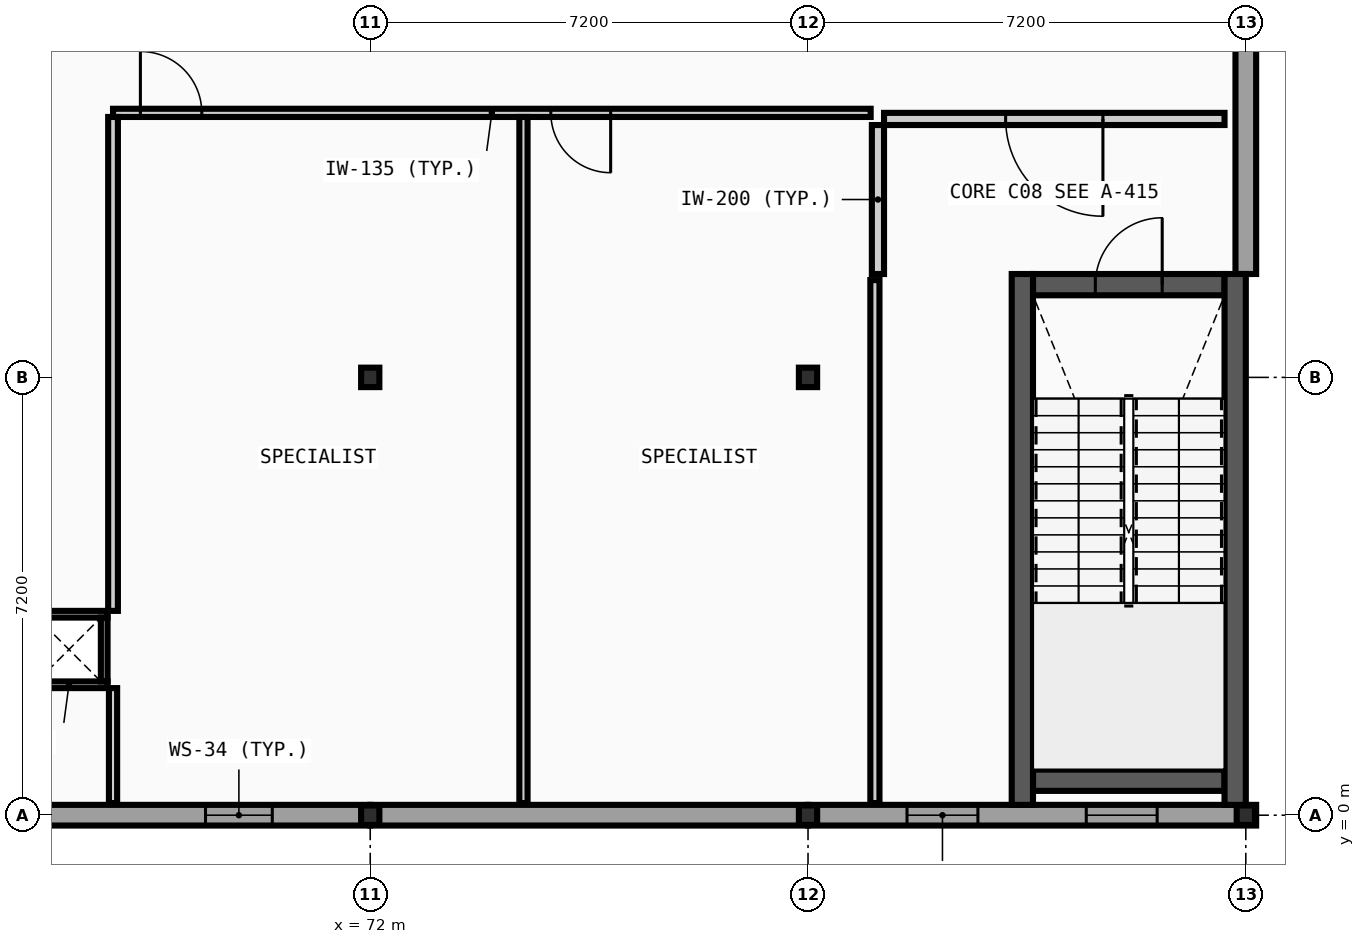
"""IFC4 building model, lengths in metres.
Left out: names, types, materials, properties, quantities, classifications, styles, units other than length and angle.
Written with IfcOpenShell. Run it as: python <this file> out.ifc"""

import sys

from ifc_helpers import new_model, si_unit, direction, frame, frame_2d, origin, origin_2d, place, context, subcontext, project, spatial, rectangle, i_section, extrude, element, fill, save


model = new_model("IFC4")
c1 = context("Model", 3, precision=1e-05, world=origin(), true_north=direction((0.0, 1.0)))
c2 = subcontext(c1, "Body", "Model", "MODEL_VIEW")
j1 = project(units=[si_unit("LENGTHUNIT", "METRE"), si_unit("PLANEANGLEUNIT", "RADIAN")], contexts=[c1])
p1 = place(None, origin())
s1 = spatial("IfcSite", under=j1, at=p1, CompositionType="ELEMENT")
p2 = place(p1, origin())
s2 = spatial("IfcBuilding", under=s1, at=p2, CompositionType="ELEMENT")
p3 = place(p2, frame((0.0, 0.0, 14.0)))
s3 = spatial("IfcBuildingStorey", under=s2, at=p3, CompositionType="ELEMENT", Elevation=14.0)
for number, where, z_axis, x_axis in (
    (1, (72.0, 0.0, 0.0), (0.0, 0.0, 1.0), (1.0, 0.0, 0.0)),
    (2, (72.0, 7.2, 0.0), (0.0, 0.0, 1.0), (1.0, 0.0, 0.0)),
    (3, (79.2, 0.0, 0.0), (0.0, 0.0, 1.0), (1.0, 0.0, 0.0)),
    (4, (79.2, 7.2, 0.0), (0.0, 0.0, 1.0), (1.0, 0.0, 0.0)),
    (5, (86.4, 0.0, 0.0), (0.0, 0.0, 1.0), (1.0, 0.0, 0.0)),
):
    element("IfcColumn", number, at=place(p3, frame(where, z_axis=z_axis, x_axis=x_axis)), inside=s3, PredefinedType="COLUMN", context=c2, shape_type="SweptSolid", body=[
        extrude(i_section(OverallWidth=0.3, OverallDepth=0.32, WebThickness=0.011, FlangeThickness=0.021, FilletRadius=0.027, at=origin_2d()), origin(), (0.0, 0.0, 1.0), 4.4),
    ])
p4 = place(p3, frame((64.8, 0.0, 0.0), z_axis=(0.0, 0.0, 1.0), x_axis=(1.0, 0.0, 0.0)))
e6 = element("IfcWall", 6, at=p4, inside=s3, PredefinedType="STANDARD", context=c2, shape_type="SweptSolid", body=[
    extrude(rectangle(XDim=7.2, YDim=0.34, at=frame_2d((3.6, 0.0))), origin(), (0.0, 0.0, 1.0), 3.935),
])
p5 = place(p4, frame((4.491, 0.0, 0.95)))
e7 = element("IfcOpeningElement", 7, at=p5, cuts=e6, PredefinedType="OPENING", context=c2, shape_type="SweptSolid", body=[
    extrude(rectangle(XDim=1.098, YDim=1.332, at=frame_2d((0.549, 0.666))), frame((0.0, 0.18, 0.0), z_axis=(0.0, -1.0, 0.0), x_axis=(1.0, 0.0, 0.0)), (0.0, 0.0, 1.0), 0.36),
])
p6 = place(p3, frame((72.0, 0.0, 0.0), z_axis=(0.0, 0.0, 1.0), x_axis=(1.0, 0.0, 0.0)))
e8 = element("IfcWall", 8, at=p6, inside=s3, PredefinedType="STANDARD", context=c2, shape_type="SweptSolid", body=[
    extrude(rectangle(XDim=7.2, YDim=0.34, at=frame_2d((3.6, 0.0))), origin(), (0.0, 0.0, 1.0), 3.935),
])
p7 = place(p3, frame((79.2, 0.0, 0.0), z_axis=(0.0, 0.0, 1.0), x_axis=(1.0, 0.0, 0.0)))
e9 = element("IfcWall", 9, at=p7, inside=s3, PredefinedType="STANDARD", context=c2, shape_type="SweptSolid", body=[
    extrude(rectangle(XDim=7.37, YDim=0.34, at=frame_2d((3.685, 0.0))), origin(), (0.0, 0.0, 1.0), 3.935),
])
p8 = place(p7, frame((1.628, 0.0, 0.95)))
e10 = element("IfcOpeningElement", 10, at=p8, cuts=e9, PredefinedType="OPENING", context=c2, shape_type="SweptSolid", body=[
    extrude(rectangle(XDim=1.166, YDim=1.332, at=frame_2d((0.583, 0.666))), frame((0.0, 0.18, 0.0), z_axis=(0.0, -1.0, 0.0), x_axis=(1.0, 0.0, 0.0)), (0.0, 0.0, 1.0), 0.36),
])
p9 = place(p7, frame((4.576, 0.0, 0.95)))
e11 = element("IfcOpeningElement", 11, at=p9, cuts=e9, PredefinedType="OPENING", context=c2, shape_type="SweptSolid", body=[
    extrude(rectangle(XDim=1.166, YDim=1.332, at=frame_2d((0.583, 0.666))), frame((0.0, 0.18, 0.0), z_axis=(0.0, -1.0, 0.0), x_axis=(1.0, 0.0, 0.0)), (0.0, 0.0, 1.0), 0.36),
])
p10 = place(p3, frame((86.4, 8.9, 0.0), z_axis=(0.0, 0.0, 1.0), x_axis=(0.0, 1.0, 0.0)))
e12 = element("IfcWall", 12, at=p10, inside=s3, PredefinedType="STANDARD", context=c2, shape_type="SweptSolid", body=[
    extrude(rectangle(XDim=5.5, YDim=0.34, at=frame_2d((2.75, 0.0))), origin(), (0.0, 0.0, 1.0), 4.2),
])
p11 = place(p3, frame((82.9, 0.575, 0.0), z_axis=(0.0, 0.0, 1.0), x_axis=(1.0, 0.0, 0.0)))
e13 = element("IfcWall", 13, at=p11, inside=s3, PredefinedType="SHEAR", context=c2, shape_type="SweptSolid", body=[
    extrude(rectangle(XDim=3.15, YDim=0.35, at=frame_2d((1.575, 0.0))), origin(), (0.0, 0.0, 1.0), 4.2),
])
p12 = place(p3, frame((82.9, 8.725, 0.0), z_axis=(0.0, 0.0, 1.0), x_axis=(1.0, 0.0, 0.0)))
e14 = element("IfcWall", 14, at=p12, inside=s3, PredefinedType="SHEAR", context=c2, shape_type="SweptSolid", body=[
    extrude(rectangle(XDim=3.15, YDim=0.35, at=frame_2d((1.575, 0.0))), origin(), (0.0, 0.0, 1.0), 4.2),
])
p13 = place(p12, frame((1.025, 0.0, 0.0)))
e15 = element("IfcOpeningElement", 15, at=p13, cuts=e14, PredefinedType="OPENING", context=c2, shape_type="SweptSolid", body=[
    extrude(rectangle(XDim=1.1, YDim=2.15, at=frame_2d((0.55, 1.075))), frame((0.0, 0.185, 0.0), z_axis=(0.0, -1.0, 0.0), x_axis=(1.0, 0.0, 0.0)), (0.0, 0.0, 1.0), 0.37),
])
for number, where, z_axis, x_axis in (
    (16, (82.725, 0.17, 0.0), (0.0, 0.0, 1.0), (0.0, 1.0, 0.0)),
    (17, (86.225, 0.17, 0.0), (0.0, 0.0, 1.0), (0.0, 1.0, 0.0)),
):
    element("IfcWall", number, at=place(p3, frame(where, z_axis=z_axis, x_axis=x_axis)), inside=s3, PredefinedType="SHEAR", context=c2, shape_type="SweptSolid", body=[
        extrude(rectangle(XDim=8.73, YDim=0.35, at=frame_2d((4.365, 0.0))), origin(), (0.0, 0.0, 1.0), 4.2),
    ])
p14 = place(p3, frame((80.45, 11.45, 0.0), z_axis=(0.0, 0.0, 1.0), x_axis=(1.0, 0.0, 0.0)))
e18 = element("IfcWall", 18, at=p14, inside=s3, PredefinedType="PARTITIONING", context=c2, shape_type="SweptSolid", body=[
    extrude(rectangle(XDim=5.6, YDim=0.2, at=frame_2d((2.8, 0.0))), origin(), (0.0, 0.0, 1.0), 4.2),
])
p15 = place(p14, frame((2.0, 0.0, 0.0)))
e19 = element("IfcOpeningElement", 19, at=p15, cuts=e18, PredefinedType="OPENING", context=c2, shape_type="SweptSolid", body=[
    extrude(rectangle(XDim=1.6, YDim=2.2, at=frame_2d((0.8, 1.1))), frame((0.0, 0.11, 0.0), z_axis=(0.0, -1.0, 0.0), x_axis=(1.0, 0.0, 0.0)), (0.0, 0.0, 1.0), 0.22),
])
p16 = place(p3, frame((80.35, 8.9, 0.0), z_axis=(0.0, 0.0, 1.0), x_axis=(0.0, 1.0, 0.0)))
e20 = element("IfcWall", 20, at=p16, inside=s3, PredefinedType="PARTITIONING", context=c2, shape_type="SweptSolid", body=[
    extrude(rectangle(XDim=2.45, YDim=0.2, at=frame_2d((1.225, 0.0))), origin(), (0.0, 0.0, 1.0), 4.2),
])
for number, where, z_axis, x_axis in (
    (21, (66.41, 2.145, 0.0), (0.0, 0.0, 1.0), (1.0, 0.0, 0.0)),
    (22, (66.41, 3.305, 0.0), (0.0, 0.0, 1.0), (1.0, 0.0, 0.0)),
):
    element("IfcWall", number, at=place(p3, frame(where, z_axis=z_axis, x_axis=x_axis)), inside=s3, PredefinedType="PARTITIONING", context=c2, shape_type="SweptSolid", body=[
        extrude(rectangle(XDim=1.27, YDim=0.11, at=frame_2d((0.635, 0.0))), origin(), (0.0, 0.0, 1.0), 4.2),
    ])
p17 = place(p3, frame((67.625, 2.2, 0.0), z_axis=(0.0, 0.0, 1.0), x_axis=(0.0, 1.0, 0.0)))
e23 = element("IfcWall", 23, at=p17, inside=s3, PredefinedType="PARTITIONING", context=c2, shape_type="SweptSolid", body=[
    extrude(rectangle(XDim=1.05, YDim=0.11, at=frame_2d((0.525, 0.0))), origin(), (0.0, 0.0, 1.0), 4.2),
])
p18 = place(p3, frame((67.77, 11.55, 0.0), z_axis=(0.0, 0.0, 1.0), x_axis=(1.0, 0.0, 0.0)))
e24 = element("IfcWall", 24, at=p18, inside=s3, PredefinedType="PARTITIONING", context=c2, shape_type="SweptSolid", body=[
    extrude(rectangle(XDim=12.46, YDim=0.135, at=frame_2d((6.23, 0.0))), origin(), (0.0, 0.0, 1.0), 4.2),
])
p19 = place(p18, frame((7.2, 0.0, 0.0)))
e25 = element("IfcOpeningElement", 25, at=p19, cuts=e24, PredefinedType="OPENING", context=c2, shape_type="SweptSolid", body=[
    extrude(rectangle(XDim=0.984, YDim=2.04, at=frame_2d((0.492, 1.02))), frame((0.0, 0.078, 0.0), z_axis=(0.0, -1.0, 0.0), x_axis=(1.0, 0.0, 0.0)), (0.0, 0.0, 1.0), 0.155),
])
p20 = place(p18, frame((0.45, 0.0, 0.0)))
e26 = element("IfcOpeningElement", 26, at=p20, cuts=e24, PredefinedType="OPENING", context=c2, shape_type="SweptSolid", body=[
    extrude(rectangle(XDim=1.01, YDim=2.04, at=frame_2d((0.505, 1.02))), frame((0.0, 0.078, 0.0), z_axis=(0.0, -1.0, 0.0), x_axis=(1.0, 0.0, 0.0)), (0.0, 0.0, 1.0), 0.155),
])
p21 = place(p3, frame((67.77, 0.2, 0.0), z_axis=(0.0, 0.0, 1.0), x_axis=(0.0, 1.0, 0.0)))
e27 = element("IfcWall", 27, at=p21, inside=s3, PredefinedType="PARTITIONING", context=c2, shape_type="SweptSolid", body=[
    extrude(rectangle(XDim=1.89, YDim=0.135, at=frame_2d((0.945, 0.0))), origin(), (0.0, 0.0, 1.0), 4.2),
])
p22 = place(p3, frame((67.77, 3.36, 0.0), z_axis=(0.0, 0.0, 1.0), x_axis=(0.0, 1.0, 0.0)))
e28 = element("IfcWall", 28, at=p22, inside=s3, PredefinedType="PARTITIONING", context=c2, shape_type="SweptSolid", body=[
    extrude(rectangle(XDim=8.122, YDim=0.16, at=frame_2d((4.061, 0.0))), origin(), (0.0, 0.0, 1.0), 4.2),
])
p23 = place(p3, frame((74.52, 0.2, 0.0), z_axis=(0.0, 0.0, 1.0), x_axis=(0.0, 1.0, 0.0)))
e29 = element("IfcWall", 29, at=p23, inside=s3, PredefinedType="PARTITIONING", context=c2, shape_type="SweptSolid", body=[
    extrude(rectangle(XDim=11.282, YDim=0.135, at=frame_2d((5.641, 0.0))), origin(), (0.0, 0.0, 1.0), 3.945),
])
p24 = place(p3, frame((80.3, 0.2, 0.0), z_axis=(0.0, 0.0, 1.0), x_axis=(0.0, 1.0, 0.0)))
e30 = element("IfcWall", 30, at=p24, inside=s3, PredefinedType="PARTITIONING", context=c2, shape_type="SweptSolid", body=[
    extrude(rectangle(XDim=8.6, YDim=0.15, at=frame_2d((4.3, 0.0))), origin(), (0.0, 0.0, 1.0), 4.2),
])
p25 = place(p5, origin())
e31 = element("IfcWindow", 31, at=p25, inside=s3, PartitioningType="SINGLE_PANEL", PredefinedType="WINDOW", context=c2, shape_type="SweptSolid", body=[
    extrude(rectangle(XDim=1.098, YDim=1.332, at=frame_2d((0.549, 0.666))), frame((0.0, 0.03, 0.0), z_axis=(0.0, -1.0, 0.0), x_axis=(1.0, 0.0, 0.0)), (0.0, 0.0, 1.0), 0.06),
])
fill(e7, e31)
p26 = place(p8, origin())
e32 = element("IfcWindow", 32, at=p26, inside=s3, PartitioningType="SINGLE_PANEL", PredefinedType="WINDOW", context=c2, shape_type="SweptSolid", body=[
    extrude(rectangle(XDim=1.166, YDim=1.332, at=frame_2d((0.583, 0.666))), frame((0.0, 0.03, 0.0), z_axis=(0.0, -1.0, 0.0), x_axis=(1.0, 0.0, 0.0)), (0.0, 0.0, 1.0), 0.06),
])
fill(e10, e32)
p27 = place(p9, origin())
e33 = element("IfcWindow", 33, at=p27, inside=s3, PartitioningType="SINGLE_PANEL", PredefinedType="WINDOW", context=c2, shape_type="SweptSolid", body=[
    extrude(rectangle(XDim=1.166, YDim=1.332, at=frame_2d((0.583, 0.666))), frame((0.0, 0.03, 0.0), z_axis=(0.0, -1.0, 0.0), x_axis=(1.0, 0.0, 0.0)), (0.0, 0.0, 1.0), 0.06),
])
fill(e11, e33)
p28 = place(p13, frame((1.1, 0.0, 0.0), z_axis=(0.0, 0.0, 1.0), x_axis=(-1.0, 0.0, 0.0)))
e34 = element("IfcDoor", 34, at=p28, inside=s3, OperationType="SINGLE_SWING_RIGHT", PredefinedType="DOOR", context=c2, shape_type="SweptSolid", body=[
    extrude(rectangle(XDim=1.1, YDim=2.15, at=frame_2d((0.55, 1.075))), frame((0.0, 0.025, 0.0), z_axis=(0.0, -1.0, 0.0), x_axis=(1.0, 0.0, 0.0)), (0.0, 0.0, 1.0), 0.05),
])
fill(e15, e34)
p29 = place(p15, origin())
e35 = element("IfcDoor", 35, at=p29, inside=s3, OperationType="DOUBLE_DOOR_SINGLE_SWING", PredefinedType="DOOR", context=c2, shape_type="SweptSolid", body=[
    extrude(rectangle(XDim=1.6, YDim=2.2, at=frame_2d((0.8, 1.1))), frame((0.0, 0.025, 0.0), z_axis=(0.0, -1.0, 0.0), x_axis=(1.0, 0.0, 0.0)), (0.0, 0.0, 1.0), 0.05),
])
fill(e19, e35)
p30 = place(p19, origin())
e36 = element("IfcDoor", 36, at=p30, inside=s3, OperationType="SINGLE_SWING_RIGHT", PredefinedType="DOOR", context=c2, shape_type="SweptSolid", body=[
    extrude(rectangle(XDim=0.984, YDim=2.04, at=frame_2d((0.492, 1.02))), frame((0.0, 0.025, 0.0), z_axis=(0.0, -1.0, 0.0), x_axis=(1.0, 0.0, 0.0)), (0.0, 0.0, 1.0), 0.05),
])
fill(e25, e36)
p31 = place(p20, origin())
e37 = element("IfcDoor", 37, at=p31, inside=s3, OperationType="SINGLE_SWING_LEFT", PredefinedType="DOOR", context=c2, shape_type="SweptSolid", body=[
    extrude(rectangle(XDim=1.01, YDim=2.04, at=frame_2d((0.505, 1.02))), frame((0.0, 0.025, 0.0), z_axis=(0.0, -1.0, 0.0), x_axis=(1.0, 0.0, 0.0)), (0.0, 0.0, 1.0), 0.05),
])
fill(e26, e37)
save(model, sys.argv[1])
